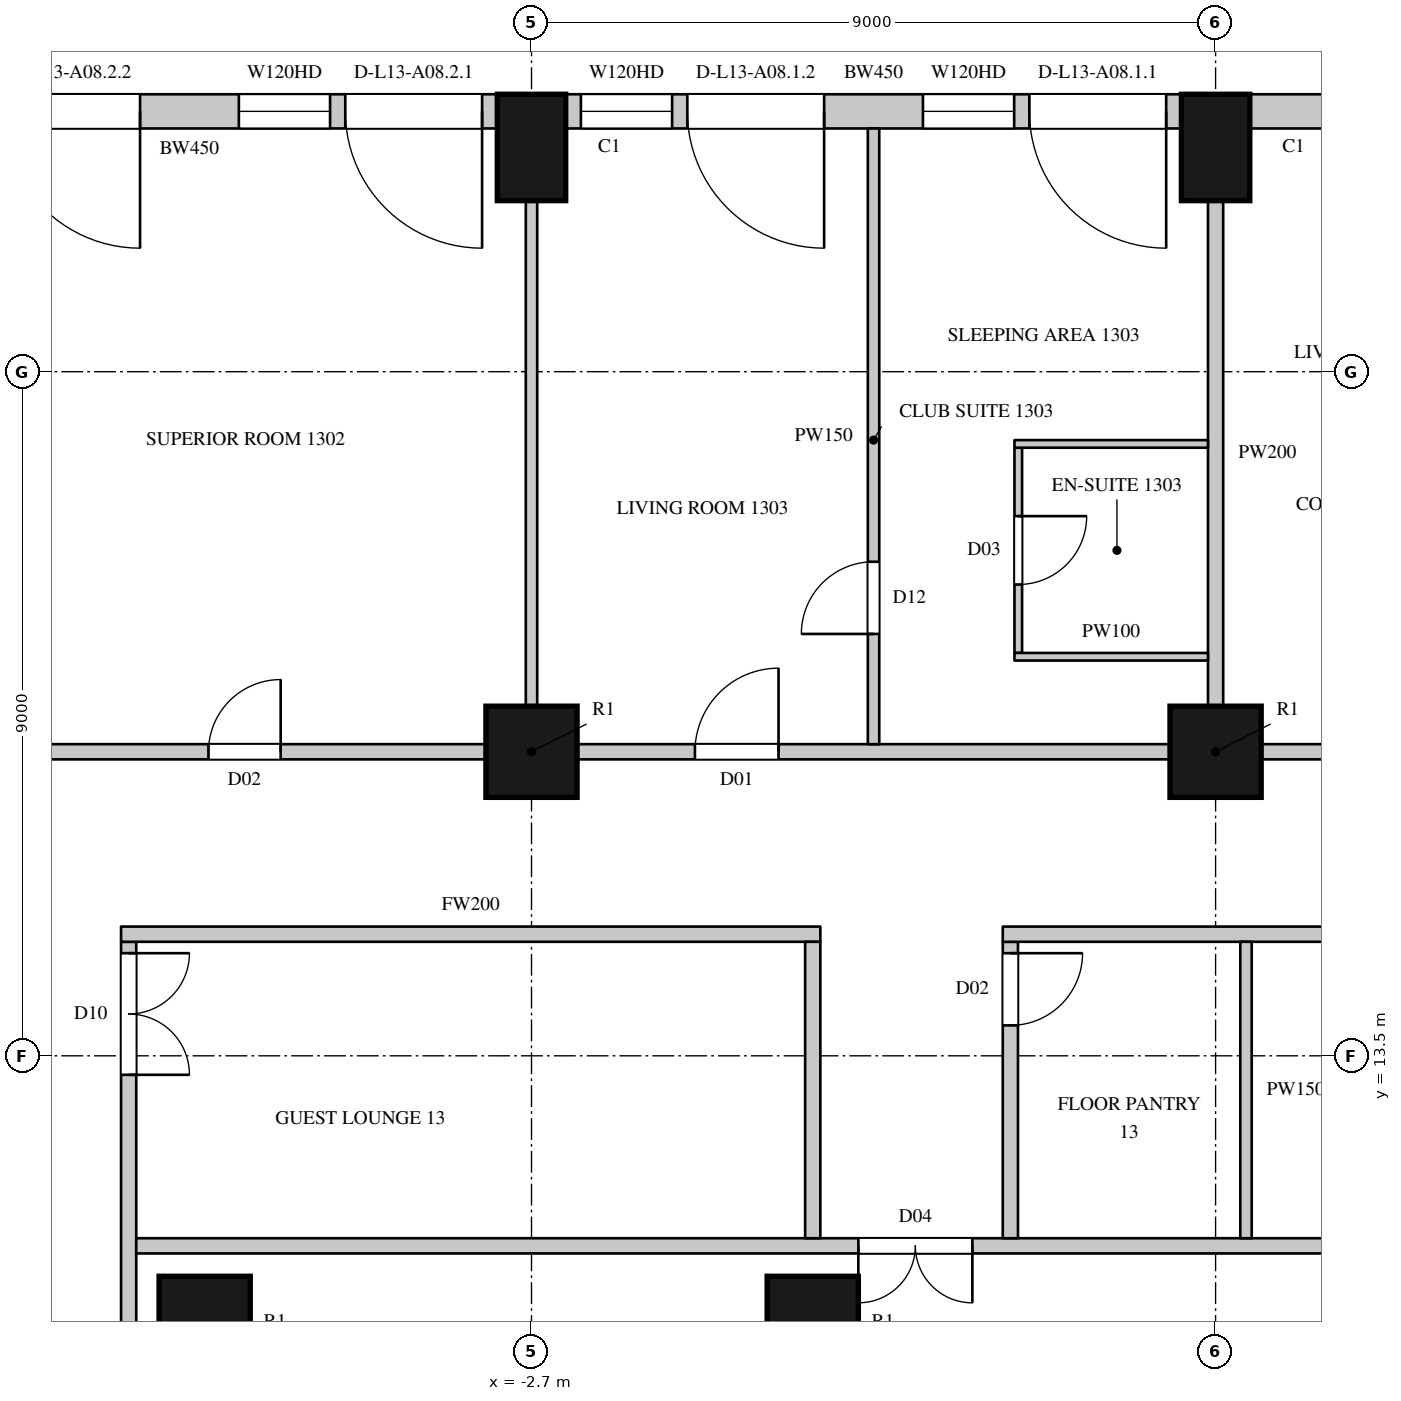
"""IFC4 building model, lengths in metres.
Left out: names, types, materials, properties, quantities, classifications, styles, units other than length and angle.
Written with IfcOpenShell. Run it as: python <this file> out.ifc"""

import sys

from ifc_helpers import new_model, si_unit, direction, frame, frame_2d, origin, origin_2d, place, context, subcontext, project, spatial, rectangle, circle, extrude, element, fill, save


model = new_model("IFC4")
c1 = context("Model", 3, precision=1e-05, world=origin(), true_north=direction((0.0, 1.0)))
c2 = subcontext(c1, "Body", "Model", "MODEL_VIEW")
j1 = project(units=[si_unit("LENGTHUNIT", "METRE"), si_unit("PLANEANGLEUNIT", "RADIAN")], contexts=[c1])
p1 = place(None, origin())
s1 = spatial("IfcSite", under=j1, at=p1, CompositionType="ELEMENT")
p2 = place(p1, origin())
s2 = spatial("IfcBuilding", under=s1, at=p2, CompositionType="ELEMENT")
p3 = place(p2, frame((0.0, 0.0, 77.1)))
s3 = spatial("IfcBuildingStorey", under=s2, at=p3, CompositionType="ELEMENT", Elevation=77.1)
for number, where, z_axis, x_axis in (
    (1, (6.3, 25.45, 0.0), (0.0, 0.0, 1.0), (-1.0, 0.0, 0.0)),
    (2, (-2.7, 25.45, 0.0), (0.0, 0.0, 1.0), (-1.0, 0.0, 0.0)),
):
    element("IfcColumn", number, at=place(p3, frame(where, z_axis=z_axis, x_axis=x_axis)), inside=s3, PredefinedType="COLUMN", context=c2, shape_type="SweptSolid", body=[
        extrude(rectangle(XDim=0.9, YDim=1.4, at=origin_2d()), origin(), (0.0, 0.0, 1.0), 3.6),
    ])
for number, where, z_axis, x_axis in (
    (3, (-2.7, 17.5, 0.0), (0.0, 0.0, 1.0), (1.0, 0.0, 0.0)),
    (4, (6.3, 17.5, 0.0), (0.0, 0.0, 1.0), (1.0, 0.0, 0.0)),
    (5, (-7.0, 10.0, 0.0), (0.0, 0.0, 1.0), (1.0, 0.0, 0.0)),
    (6, (1.0, 10.0, 0.0), (0.0, 0.0, 1.0), (1.0, 0.0, 0.0)),
):
    element("IfcColumn", number, at=place(p3, frame(where, z_axis=z_axis, x_axis=x_axis)), inside=s3, PredefinedType="COLUMN", context=c2, shape_type="SweptSolid", body=[
        extrude(circle(Radius=0.6, at=origin_2d()), origin(), (0.0, 0.0, 1.0), 3.6),
    ])
p4 = place(p3, frame((11.989, 25.925, 0.0), z_axis=(0.0, 0.0, 1.0), x_axis=(-1.0, 0.0, 0.0)))
e7 = element("IfcWall", 7, at=p4, inside=s3, PredefinedType="SOLIDWALL", context=c2, shape_type="SweptSolid", body=[
    extrude(rectangle(XDim=5.239, YDim=0.45, at=frame_2d((2.619, 0.0))), origin(), (0.0, 0.0, 1.0), 3.3),
])
p5 = place(p4, frame((1.77, 0.0, 1.05)))
e8 = element("IfcOpeningElement", 8, at=p5, cuts=e7, PredefinedType="OPENING", context=c2, shape_type="SweptSolid", body=[
    extrude(rectangle(XDim=2.1, YDim=2.0, at=frame_2d((1.05, 1.0))), frame((0.0, 0.235, 0.0), z_axis=(0.0, -1.0, 0.0), x_axis=(1.0, 0.0, 0.0)), (0.0, 0.0, 1.0), 0.47),
])
p6 = place(p3, frame((5.85, 25.925, 0.0), z_axis=(0.0, 0.0, 1.0), x_axis=(-1.0, 0.0, 0.0)))
e9 = element("IfcWall", 9, at=p6, inside=s3, PredefinedType="SOLIDWALL", context=c2, shape_type="SweptSolid", body=[
    extrude(rectangle(XDim=8.1, YDim=0.45, at=frame_2d((4.05, 0.0))), origin(), (0.0, 0.0, 1.0), 3.3),
])
p7 = place(p6, frame((0.2, 0.0, 0.0)))
e10 = element("IfcOpeningElement", 10, at=p7, cuts=e9, PredefinedType="OPENING", context=c2, shape_type="SweptSolid", body=[
    extrude(rectangle(XDim=1.8, YDim=2.4, at=frame_2d((0.9, 1.2))), frame((0.0, 0.235, 0.0), z_axis=(0.0, -1.0, 0.0), x_axis=(1.0, 0.0, 0.0)), (0.0, 0.0, 1.0), 0.47),
])
p8 = place(p6, frame((2.2, 0.0, 1.05)))
e11 = element("IfcOpeningElement", 11, at=p8, cuts=e9, PredefinedType="OPENING", context=c2, shape_type="SweptSolid", body=[
    extrude(rectangle(XDim=1.2, YDim=2.0, at=frame_2d((0.6, 1.0))), frame((0.0, 0.235, 0.0), z_axis=(0.0, -1.0, 0.0), x_axis=(1.0, 0.0, 0.0)), (0.0, 0.0, 1.0), 0.47),
])
p9 = place(p6, frame((4.7, 0.0, 0.0)))
e12 = element("IfcOpeningElement", 12, at=p9, cuts=e9, PredefinedType="OPENING", context=c2, shape_type="SweptSolid", body=[
    extrude(rectangle(XDim=1.8, YDim=2.4, at=frame_2d((0.9, 1.2))), frame((0.0, 0.235, 0.0), z_axis=(0.0, -1.0, 0.0), x_axis=(1.0, 0.0, 0.0)), (0.0, 0.0, 1.0), 0.47),
])
p10 = place(p6, frame((6.7, 0.0, 1.05)))
e13 = element("IfcOpeningElement", 13, at=p10, cuts=e9, PredefinedType="OPENING", context=c2, shape_type="SweptSolid", body=[
    extrude(rectangle(XDim=1.2, YDim=2.0, at=frame_2d((0.6, 1.0))), frame((0.0, 0.235, 0.0), z_axis=(0.0, -1.0, 0.0), x_axis=(1.0, 0.0, 0.0)), (0.0, 0.0, 1.0), 0.47),
])
p11 = place(p3, frame((-3.15, 25.925, 0.0), z_axis=(0.0, 0.0, 1.0), x_axis=(-1.0, 0.0, 0.0)))
e14 = element("IfcWall", 14, at=p11, inside=s3, PredefinedType="SOLIDWALL", context=c2, shape_type="SweptSolid", body=[
    extrude(rectangle(XDim=8.1, YDim=0.45, at=frame_2d((4.05, 0.0))), origin(), (0.0, 0.0, 1.0), 3.3),
])
p12 = place(p11, frame((0.2, 0.0, 0.0)))
e15 = element("IfcOpeningElement", 15, at=p12, cuts=e14, PredefinedType="OPENING", context=c2, shape_type="SweptSolid", body=[
    extrude(rectangle(XDim=1.8, YDim=2.4, at=frame_2d((0.9, 1.2))), frame((0.0, 0.235, 0.0), z_axis=(0.0, -1.0, 0.0), x_axis=(1.0, 0.0, 0.0)), (0.0, 0.0, 1.0), 0.47),
])
p13 = place(p11, frame((2.2, 0.0, 1.05)))
e16 = element("IfcOpeningElement", 16, at=p13, cuts=e14, PredefinedType="OPENING", context=c2, shape_type="SweptSolid", body=[
    extrude(rectangle(XDim=1.2, YDim=2.0, at=frame_2d((0.6, 1.0))), frame((0.0, 0.235, 0.0), z_axis=(0.0, -1.0, 0.0), x_axis=(1.0, 0.0, 0.0)), (0.0, 0.0, 1.0), 0.47),
])
p14 = place(p11, frame((4.7, 0.0, 0.0)))
e17 = element("IfcOpeningElement", 17, at=p14, cuts=e14, PredefinedType="OPENING", context=c2, shape_type="SweptSolid", body=[
    extrude(rectangle(XDim=1.8, YDim=2.4, at=frame_2d((0.9, 1.2))), frame((0.0, 0.235, 0.0), z_axis=(0.0, -1.0, 0.0), x_axis=(1.0, 0.0, 0.0)), (0.0, 0.0, 1.0), 0.47),
])
p15 = place(p11, frame((6.7, 0.0, 1.05)))
e18 = element("IfcOpeningElement", 18, at=p15, cuts=e14, PredefinedType="OPENING", context=c2, shape_type="SweptSolid", body=[
    extrude(rectangle(XDim=1.2, YDim=2.0, at=frame_2d((0.6, 1.0))), frame((0.0, 0.235, 0.0), z_axis=(0.0, -1.0, 0.0), x_axis=(1.0, 0.0, 0.0)), (0.0, 0.0, 1.0), 0.47),
])
p16 = place(p3, frame((-11.1, 17.5, 0.0), z_axis=(0.0, 0.0, 1.0), x_axis=(1.0, 0.0, 0.0)))
e19 = element("IfcWall", 19, at=p16, inside=s3, PredefinedType="PARTITIONING", context=c2, shape_type="SweptSolid", body=[
    extrude(rectangle(XDim=7.8, YDim=0.2, at=frame_2d((3.9, 0.0))), origin(), (0.0, 0.0, 1.0), 2.75),
])
p17 = place(p16, frame((4.15, 0.0, 0.0)))
e20 = element("IfcOpeningElement", 20, at=p17, cuts=e19, PredefinedType="OPENING", context=c2, shape_type="SweptSolid", body=[
    extrude(rectangle(XDim=0.95, YDim=2.2, at=frame_2d((0.475, 1.1))), frame((0.0, 0.11, 0.0), z_axis=(0.0, -1.0, 0.0), x_axis=(1.0, 0.0, 0.0)), (0.0, 0.0, 1.0), 0.22),
])
p18 = place(p3, frame((-2.1, 17.5, 0.0), z_axis=(0.0, 0.0, 1.0), x_axis=(1.0, 0.0, 0.0)))
e21 = element("IfcWall", 21, at=p18, inside=s3, PredefinedType="PARTITIONING", context=c2, shape_type="SweptSolid", body=[
    extrude(rectangle(XDim=7.8, YDim=0.2, at=frame_2d((3.9, 0.0))), origin(), (0.0, 0.0, 1.0), 2.75),
])
p19 = place(p18, frame((1.55, 0.0, 0.0)))
e22 = element("IfcOpeningElement", 22, at=p19, cuts=e21, PredefinedType="OPENING", context=c2, shape_type="SweptSolid", body=[
    extrude(rectangle(XDim=1.1, YDim=2.4, at=frame_2d((0.55, 1.2))), frame((0.0, 0.11, 0.0), z_axis=(0.0, -1.0, 0.0), x_axis=(1.0, 0.0, 0.0)), (0.0, 0.0, 1.0), 0.22),
])
p20 = place(p3, frame((6.9, 17.5, 0.0), z_axis=(0.0, 0.0, 1.0), x_axis=(1.0, 0.0, 0.0)))
e23 = element("IfcWall", 23, at=p20, inside=s3, PredefinedType="PARTITIONING", context=c2, shape_type="SweptSolid", body=[
    extrude(rectangle(XDim=7.8, YDim=0.2, at=frame_2d((3.9, 0.0))), origin(), (0.0, 0.0, 1.0), 2.75),
])
p21 = place(p20, frame((1.45, 0.0, 0.0)))
e24 = element("IfcOpeningElement", 24, at=p21, cuts=e23, PredefinedType="OPENING", context=c2, shape_type="SweptSolid", body=[
    extrude(rectangle(XDim=1.1, YDim=2.4, at=frame_2d((0.55, 1.2))), frame((0.0, 0.11, 0.0), z_axis=(0.0, -1.0, 0.0), x_axis=(1.0, 0.0, 0.0)), (0.0, 0.0, 1.0), 0.22),
])
p22 = place(p3, frame((-8.0, -10.9, 0.0), z_axis=(0.0, 0.0, 1.0), x_axis=(0.0, 1.0, 0.0)))
e25 = element("IfcWall", 25, at=p22, inside=s3, PredefinedType="PARTITIONING", context=c2, shape_type="SweptSolid", body=[
    extrude(rectangle(XDim=25.9, YDim=0.2, at=frame_2d((12.95, 0.0))), origin(), (0.0, 0.0, 1.0), 3.3),
])
p23 = place(p22, frame((14.65, 0.0, 0.0)))
e26 = element("IfcOpeningElement", 26, at=p23, cuts=e25, PredefinedType="OPENING", context=c2, shape_type="SweptSolid", body=[
    extrude(rectangle(XDim=1.5, YDim=2.2, at=frame_2d((0.75, 1.1))), frame((0.0, 0.11, 0.0), z_axis=(0.0, -1.0, 0.0), x_axis=(1.0, 0.0, 0.0)), (0.0, 0.0, 1.0), 0.22),
])
p24 = place(p22, frame((24.15, 0.0, 0.0)))
e27 = element("IfcOpeningElement", 27, at=p24, cuts=e25, PredefinedType="OPENING", context=c2, shape_type="SweptSolid", body=[
    extrude(rectangle(XDim=1.6, YDim=2.4, at=frame_2d((0.8, 1.2))), frame((0.0, 0.11, 0.0), z_axis=(0.0, -1.0, 0.0), x_axis=(1.0, 0.0, 0.0)), (0.0, 0.0, 1.0), 0.22),
])
p25 = place(p3, frame((-7.9, 11.0, 0.0), z_axis=(0.0, 0.0, 1.0), x_axis=(1.0, 0.0, 0.0)))
e28 = element("IfcWall", 28, at=p25, inside=s3, PredefinedType="PARTITIONING", context=c2, shape_type="SweptSolid", body=[
    extrude(rectangle(XDim=17.9, YDim=0.2, at=frame_2d((8.95, 0.0))), origin(), (0.0, 0.0, 1.0), 3.3),
])
p26 = place(p25, frame((9.5, 0.0, 0.0)))
e29 = element("IfcOpeningElement", 29, at=p26, cuts=e28, PredefinedType="OPENING", context=c2, shape_type="SweptSolid", body=[
    extrude(rectangle(XDim=1.5, YDim=2.2, at=frame_2d((0.75, 1.1))), frame((0.0, 0.11, 0.0), z_axis=(0.0, -1.0, 0.0), x_axis=(1.0, 0.0, 0.0)), (0.0, 0.0, 1.0), 0.22),
])
p27 = place(p3, frame((-8.1, 15.1, 0.0), z_axis=(0.0, 0.0, 1.0), x_axis=(1.0, 0.0, 0.0)))
e30 = element("IfcWall", 30, at=p27, inside=s3, PredefinedType="PARTITIONING", context=c2, shape_type="SweptSolid", body=[
    extrude(rectangle(XDim=9.2, YDim=0.2, at=frame_2d((4.6, 0.0))), origin(), (0.0, 0.0, 1.0), 3.3),
])
p28 = place(p3, frame((1.0, 11.1, 0.0), z_axis=(0.0, 0.0, 1.0), x_axis=(0.0, 1.0, 0.0)))
e31 = element("IfcWall", 31, at=p28, inside=s3, PredefinedType="PARTITIONING", context=c2, shape_type="SweptSolid", body=[
    extrude(rectangle(XDim=3.9, YDim=0.2, at=frame_2d((1.95, 0.0))), origin(), (0.0, 0.0, 1.0), 3.3),
])
p29 = place(p3, frame((3.6, 11.1, 0.0), z_axis=(0.0, 0.0, 1.0), x_axis=(0.0, 1.0, 0.0)))
e32 = element("IfcWall", 32, at=p29, inside=s3, PredefinedType="PARTITIONING", context=c2, shape_type="SweptSolid", body=[
    extrude(rectangle(XDim=3.9, YDim=0.2, at=frame_2d((1.95, 0.0))), origin(), (0.0, 0.0, 1.0), 3.3),
])
p30 = place(p29, frame((2.8, 0.0, 0.0)))
e33 = element("IfcOpeningElement", 33, at=p30, cuts=e32, PredefinedType="OPENING", context=c2, shape_type="SweptSolid", body=[
    extrude(rectangle(XDim=0.95, YDim=2.2, at=frame_2d((0.475, 1.1))), frame((0.0, 0.11, 0.0), z_axis=(0.0, -1.0, 0.0), x_axis=(1.0, 0.0, 0.0)), (0.0, 0.0, 1.0), 0.22),
])
p31 = place(p3, frame((3.5, 15.1, 0.0), z_axis=(0.0, 0.0, 1.0), x_axis=(1.0, 0.0, 0.0)))
e34 = element("IfcWall", 34, at=p31, inside=s3, PredefinedType="PARTITIONING", context=c2, shape_type="SweptSolid", body=[
    extrude(rectangle(XDim=10.3, YDim=0.2, at=frame_2d((5.15, 0.0))), origin(), (0.0, 0.0, 1.0), 3.3),
])
p32 = place(p31, frame((6.2, 0.0, 0.0)))
e35 = element("IfcOpeningElement", 35, at=p32, cuts=e34, PredefinedType="OPENING", context=c2, shape_type="SweptSolid", body=[
    extrude(rectangle(XDim=0.95, YDim=2.2, at=frame_2d((0.475, 1.1))), frame((0.0, 0.11, 0.0), z_axis=(0.0, -1.0, 0.0), x_axis=(1.0, 0.0, 0.0)), (0.0, 0.0, 1.0), 0.22),
])
p33 = place(p3, frame((-2.7, 18.1, 0.0), z_axis=(0.0, 0.0, 1.0), x_axis=(0.0, 1.0, 0.0)))
e36 = element("IfcWall", 36, at=p33, inside=s3, PredefinedType="PARTITIONING", context=c2, shape_type="SweptSolid", body=[
    extrude(rectangle(XDim=6.65, YDim=0.15, at=frame_2d((3.325, 0.0))), origin(), (0.0, 0.0, 1.0), 2.75),
])
p34 = place(p3, frame((1.8, 17.6, 0.0), z_axis=(0.0, 0.0, 1.0), x_axis=(0.0, 1.0, 0.0)))
e37 = element("IfcWall", 37, at=p34, inside=s3, PredefinedType="PARTITIONING", context=c2, shape_type="SweptSolid", body=[
    extrude(rectangle(XDim=8.1, YDim=0.15, at=frame_2d((4.05, 0.0))), origin(), (0.0, 0.0, 1.0), 2.65),
])
p35 = place(p34, frame((1.45, 0.0, 0.0)))
e38 = element("IfcOpeningElement", 38, at=p35, cuts=e37, PredefinedType="OPENING", context=c2, shape_type="SweptSolid", body=[
    extrude(rectangle(XDim=0.95, YDim=2.2, at=frame_2d((0.475, 1.1))), frame((0.0, 0.085, 0.0), z_axis=(0.0, -1.0, 0.0), x_axis=(1.0, 0.0, 0.0)), (0.0, 0.0, 1.0), 0.17),
])
p36 = place(p3, frame((6.7, 11.1, 0.0), z_axis=(0.0, 0.0, 1.0), x_axis=(0.0, 1.0, 0.0)))
e39 = element("IfcWall", 39, at=p36, inside=s3, PredefinedType="PARTITIONING", context=c2, shape_type="SweptSolid", body=[
    extrude(rectangle(XDim=3.9, YDim=0.15, at=frame_2d((1.95, 0.0))), origin(), (0.0, 0.0, 1.0), 3.3),
])
p37 = place(p3, frame((6.3, 18.1, 0.0), z_axis=(0.0, 0.0, 1.0), x_axis=(0.0, 1.0, 0.0)))
e40 = element("IfcWall", 40, at=p37, inside=s3, PredefinedType="PARTITIONING", context=c2, shape_type="SweptSolid", body=[
    extrude(rectangle(XDim=6.65, YDim=0.2, at=frame_2d((3.325, 0.0))), origin(), (0.0, 0.0, 1.0), 2.75),
])
p38 = place(p3, frame((3.704, 18.8, 0.0), z_axis=(0.0, 0.0, 1.0), x_axis=(0.0, 1.0, 0.0)))
e41 = element("IfcWall", 41, at=p38, inside=s3, PredefinedType="PARTITIONING", context=c2, shape_type="SweptSolid", body=[
    extrude(rectangle(XDim=2.7, YDim=0.1, at=frame_2d((1.35, 0.0))), origin(), (0.0, 0.0, 1.0), 3.3),
])
p39 = place(p38, frame((0.9, 0.0, 0.0)))
e42 = element("IfcOpeningElement", 42, at=p39, cuts=e41, PredefinedType="OPENING", context=c2, shape_type="SweptSolid", body=[
    extrude(rectangle(XDim=0.9, YDim=2.2, at=frame_2d((0.45, 1.1))), frame((0.0, 0.06, 0.0), z_axis=(0.0, -1.0, 0.0), x_axis=(1.0, 0.0, 0.0)), (0.0, 0.0, 1.0), 0.12),
])
for number, where, z_axis, x_axis in (
    (43, (3.654, 18.75, 0.0), (0.0, 0.0, 1.0), (1.0, 0.0, 0.0)),
    (44, (3.654, 21.55, 0.0), (0.0, 0.0, 1.0), (1.0, 0.0, 0.0)),
):
    element("IfcWall", number, at=place(p3, frame(where, z_axis=z_axis, x_axis=x_axis)), inside=s3, PredefinedType="PARTITIONING", context=c2, shape_type="SweptSolid", body=[
        extrude(rectangle(XDim=2.546, YDim=0.1, at=frame_2d((1.273, 0.0))), origin(), (0.0, 0.0, 1.0), 3.3),
    ])
p40 = place(p7, origin())
e45 = element("IfcDoor", 45, at=p40, inside=s3, OperationType="SLIDING_TO_LEFT", PredefinedType="DOOR", context=c2, shape_type="SweptSolid", body=[
    extrude(rectangle(XDim=1.8, YDim=2.4, at=frame_2d((0.9, 1.2))), frame((0.0, 0.13, 0.0), z_axis=(0.0, -1.0, 0.0), x_axis=(1.0, 0.0, 0.0)), (0.0, 0.0, 1.0), 0.05),
])
fill(e10, e45)
p41 = place(p8, origin())
e46 = element("IfcWindow", 46, at=p41, inside=s3, PartitioningType="SINGLE_PANEL", PredefinedType="WINDOW", context=c2, shape_type="SweptSolid", body=[
    extrude(rectangle(XDim=1.2, YDim=2.0, at=frame_2d((0.6, 1.0))), frame((0.0, 0.135, 0.0), z_axis=(0.0, -1.0, 0.0), x_axis=(1.0, 0.0, 0.0)), (0.0, 0.0, 1.0), 0.06),
])
fill(e11, e46)
p42 = place(p9, origin())
e47 = element("IfcDoor", 47, at=p42, inside=s3, OperationType="SLIDING_TO_LEFT", PredefinedType="DOOR", context=c2, shape_type="SweptSolid", body=[
    extrude(rectangle(XDim=1.8, YDim=2.4, at=frame_2d((0.9, 1.2))), frame((0.0, 0.13, 0.0), z_axis=(0.0, -1.0, 0.0), x_axis=(1.0, 0.0, 0.0)), (0.0, 0.0, 1.0), 0.05),
])
fill(e12, e47)
p43 = place(p10, origin())
e48 = element("IfcWindow", 48, at=p43, inside=s3, PartitioningType="SINGLE_PANEL", PredefinedType="WINDOW", context=c2, shape_type="SweptSolid", body=[
    extrude(rectangle(XDim=1.2, YDim=2.0, at=frame_2d((0.6, 1.0))), frame((0.0, 0.135, 0.0), z_axis=(0.0, -1.0, 0.0), x_axis=(1.0, 0.0, 0.0)), (0.0, 0.0, 1.0), 0.06),
])
fill(e13, e48)
p44 = place(p12, origin())
e49 = element("IfcDoor", 49, at=p44, inside=s3, OperationType="SLIDING_TO_LEFT", PredefinedType="DOOR", context=c2, shape_type="SweptSolid", body=[
    extrude(rectangle(XDim=1.8, YDim=2.4, at=frame_2d((0.9, 1.2))), frame((0.0, 0.13, 0.0), z_axis=(0.0, -1.0, 0.0), x_axis=(1.0, 0.0, 0.0)), (0.0, 0.0, 1.0), 0.05),
])
fill(e15, e49)
p45 = place(p13, origin())
e50 = element("IfcWindow", 50, at=p45, inside=s3, PartitioningType="SINGLE_PANEL", PredefinedType="WINDOW", context=c2, shape_type="SweptSolid", body=[
    extrude(rectangle(XDim=1.2, YDim=2.0, at=frame_2d((0.6, 1.0))), frame((0.0, 0.135, 0.0), z_axis=(0.0, -1.0, 0.0), x_axis=(1.0, 0.0, 0.0)), (0.0, 0.0, 1.0), 0.06),
])
fill(e16, e50)
p46 = place(p14, origin())
e51 = element("IfcDoor", 51, at=p46, inside=s3, OperationType="SLIDING_TO_LEFT", PredefinedType="DOOR", context=c2, shape_type="SweptSolid", body=[
    extrude(rectangle(XDim=1.8, YDim=2.4, at=frame_2d((0.9, 1.2))), frame((0.0, 0.13, 0.0), z_axis=(0.0, -1.0, 0.0), x_axis=(1.0, 0.0, 0.0)), (0.0, 0.0, 1.0), 0.05),
])
fill(e17, e51)
p47 = place(p26, origin())
e52 = element("IfcDoor", 52, at=p47, inside=s3, OperationType="DOUBLE_DOOR_SINGLE_SWING", PredefinedType="DOOR", context=c2, shape_type="SweptSolid", body=[
    extrude(rectangle(XDim=1.5, YDim=2.2, at=frame_2d((0.75, 1.1))), frame((0.0, 0.025, 0.0), z_axis=(0.0, -1.0, 0.0), x_axis=(1.0, 0.0, 0.0)), (0.0, 0.0, 1.0), 0.05),
])
fill(e29, e52)
p48 = place(p24, origin())
e53 = element("IfcDoor", 53, at=p48, inside=s3, OperationType="DOUBLE_DOOR_SINGLE_SWING", PredefinedType="DOOR", context=c2, shape_type="SweptSolid", body=[
    extrude(rectangle(XDim=1.6, YDim=2.4, at=frame_2d((0.8, 1.2))), frame((0.0, 0.025, 0.0), z_axis=(0.0, -1.0, 0.0), x_axis=(1.0, 0.0, 0.0)), (0.0, 0.0, 1.0), 0.05),
])
fill(e27, e53)
p49 = place(p30, origin())
e54 = element("IfcDoor", 54, at=p49, inside=s3, OperationType="SINGLE_SWING_LEFT", PredefinedType="DOOR", context=c2, shape_type="SweptSolid", body=[
    extrude(rectangle(XDim=0.95, YDim=2.2, at=frame_2d((0.475, 1.1))), frame((0.0, 0.025, 0.0), z_axis=(0.0, -1.0, 0.0), x_axis=(1.0, 0.0, 0.0)), (0.0, 0.0, 1.0), 0.05),
])
fill(e33, e54)
p50 = place(p17, origin())
e55 = element("IfcDoor", 55, at=p50, inside=s3, OperationType="SINGLE_SWING_RIGHT", PredefinedType="DOOR", context=c2, shape_type="SweptSolid", body=[
    extrude(rectangle(XDim=0.95, YDim=2.2, at=frame_2d((0.475, 1.1))), frame((0.0, 0.025, 0.0), z_axis=(0.0, -1.0, 0.0), x_axis=(1.0, 0.0, 0.0)), (0.0, 0.0, 1.0), 0.05),
])
fill(e20, e55)
p51 = place(p19, origin())
e56 = element("IfcDoor", 56, at=p51, inside=s3, OperationType="SINGLE_SWING_RIGHT", PredefinedType="DOOR", context=c2, shape_type="SweptSolid", body=[
    extrude(rectangle(XDim=1.1, YDim=2.4, at=frame_2d((0.55, 1.2))), frame((0.0, 0.025, 0.0), z_axis=(0.0, -1.0, 0.0), x_axis=(1.0, 0.0, 0.0)), (0.0, 0.0, 1.0), 0.05),
])
fill(e22, e56)
p52 = place(p35, origin())
e57 = element("IfcDoor", 57, at=p52, inside=s3, OperationType="SINGLE_SWING_LEFT", PredefinedType="DOOR", context=c2, shape_type="SweptSolid", body=[
    extrude(rectangle(XDim=0.95, YDim=2.2, at=frame_2d((0.475, 1.1))), frame((0.0, 0.025, 0.0), z_axis=(0.0, -1.0, 0.0), x_axis=(1.0, 0.0, 0.0)), (0.0, 0.0, 1.0), 0.05),
])
fill(e38, e57)
p53 = place(p39, origin())
e58 = element("IfcDoor", 58, at=p53, inside=s3, OperationType="SINGLE_SWING_LEFT", PredefinedType="DOOR", context=c2, shape_type="SweptSolid", body=[
    extrude(rectangle(XDim=0.9, YDim=2.2, at=frame_2d((0.45, 1.1))), frame((0.0, 0.025, 0.0), z_axis=(0.0, -1.0, 0.0), x_axis=(1.0, 0.0, 0.0)), (0.0, 0.0, 1.0), 0.05),
])
fill(e42, e58)
save(model, sys.argv[1])
